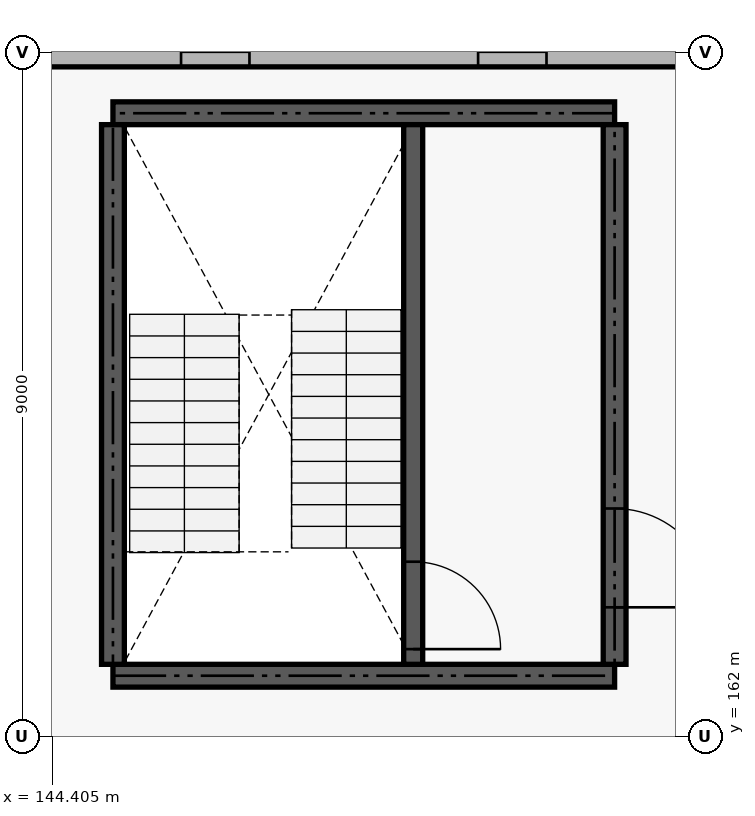
"""IFC4 building model, lengths in metres.
Left out: names, types, materials, properties, quantities, classifications, styles, units other than length and angle.
Written with IfcOpenShell. Run it as: python <this file> out.ifc"""

import sys

from ifc_helpers import new_model, si_unit, direction, frame, frame_2d, origin, place, context, subcontext, project, spatial, rectangle, extrude, element, fill, save


model = new_model("IFC4")
c1 = context("Model", 3, precision=1e-05, world=origin(), true_north=direction((0.0, 1.0)))
c2 = subcontext(c1, "Body", "Model", "MODEL_VIEW")
j1 = project(units=[si_unit("LENGTHUNIT", "METRE"), si_unit("PLANEANGLEUNIT", "RADIAN")], contexts=[c1])
p1 = place(None, origin())
s1 = spatial("IfcSite", under=j1, at=p1, CompositionType="ELEMENT")
p2 = place(p1, origin())
s2 = spatial("IfcBuilding", under=s1, at=p2, CompositionType="ELEMENT")
p3 = place(p2, frame((0.0, 0.0, 5.4)))
s3 = spatial("IfcBuildingStorey", under=s2, at=p3, CompositionType="ELEMENT", Elevation=5.4)
p4 = place(p3, frame((144.06, 171.0, 0.0), z_axis=(0.0, 0.0, 1.0), x_axis=(1.0, 0.0, 0.0)))
e1 = element("IfcWall", 1, at=p4, inside=s3, PredefinedType="SOLIDWALL", context=c2, shape_type="SweptSolid", body=[
    extrude(rectangle(XDim=8.88, YDim=0.38, at=frame_2d((4.44, 0.0))), origin(), (0.0, 0.0, 1.0), 3.4),
])
p5 = place(p4, frame((2.036, 0.0, 0.9)))
e2 = element("IfcOpeningElement", 2, at=p5, cuts=e1, PredefinedType="OPENING", context=c2, shape_type="SweptSolid", body=[
    extrude(rectangle(XDim=0.9, YDim=1.2, at=frame_2d((0.45, 0.6))), frame((0.0, 0.2, 0.0), z_axis=(0.0, -1.0, 0.0), x_axis=(1.0, 0.0, 0.0)), (0.0, 0.0, 1.0), 0.4),
])
p6 = place(p4, frame((5.944, 0.0, 0.9)))
e3 = element("IfcOpeningElement", 3, at=p6, cuts=e1, PredefinedType="OPENING", context=c2, shape_type="SweptSolid", body=[
    extrude(rectangle(XDim=0.9, YDim=1.2, at=frame_2d((0.45, 0.6))), frame((0.0, 0.2, 0.0), z_axis=(0.0, -1.0, 0.0), x_axis=(1.0, 0.0, 0.0)), (0.0, 0.0, 1.0), 0.4),
])
for number, where, z_axis, x_axis in (
    (4, (145.2, 162.8, 0.0), (0.0, 0.0, 1.0), (1.0, 0.0, 0.0)),
    (5, (145.2, 170.2, 0.0), (0.0, 0.0, 1.0), (1.0, 0.0, 0.0)),
):
    element("IfcWall", number, at=place(p3, frame(where, z_axis=z_axis, x_axis=x_axis)), inside=s3, PredefinedType="SHEAR", context=c2, shape_type="SweptSolid", body=[
        extrude(rectangle(XDim=6.6, YDim=0.3, at=frame_2d((3.3, 0.0))), origin(), (0.0, 0.0, 1.0), 4.2),
    ])
p7 = place(p3, frame((145.2, 162.95, 0.0), z_axis=(0.0, 0.0, 1.0), x_axis=(0.0, 1.0, 0.0)))
e6 = element("IfcWall", 6, at=p7, inside=s3, PredefinedType="SHEAR", context=c2, shape_type="SweptSolid", body=[
    extrude(rectangle(XDim=7.1, YDim=0.3, at=frame_2d((3.55, 0.0))), origin(), (0.0, 0.0, 1.0), 4.2),
])
p8 = place(p3, frame((151.8, 162.95, 0.0), z_axis=(0.0, 0.0, 1.0), x_axis=(0.0, 1.0, 0.0)))
e7 = element("IfcWall", 7, at=p8, inside=s3, PredefinedType="SHEAR", context=c2, shape_type="SweptSolid", body=[
    extrude(rectangle(XDim=7.1, YDim=0.3, at=frame_2d((3.55, 0.0))), origin(), (0.0, 0.0, 1.0), 4.2),
])
p9 = place(p8, frame((0.75, 0.0, 0.0)))
e8 = element("IfcOpeningElement", 8, at=p9, cuts=e7, PredefinedType="OPENING", context=c2, shape_type="SweptSolid", body=[
    extrude(rectangle(XDim=1.3, YDim=2.15, at=frame_2d((0.65, 1.075))), frame((0.0, 0.16, 0.0), z_axis=(0.0, -1.0, 0.0), x_axis=(1.0, 0.0, 0.0)), (0.0, 0.0, 1.0), 0.32),
])
p10 = place(p3, frame((149.15, 162.95, 0.0), z_axis=(0.0, 0.0, 1.0), x_axis=(0.0, 1.0, 0.0)))
e9 = element("IfcWall", 9, at=p10, inside=s3, PredefinedType="SHEAR", context=c2, shape_type="SweptSolid", body=[
    extrude(rectangle(XDim=7.1, YDim=0.25, at=frame_2d((3.55, 0.0))), origin(), (0.0, 0.0, 1.0), 4.2),
])
p11 = place(p10, frame((0.2, 0.0, 0.0)))
e10 = element("IfcOpeningElement", 10, at=p11, cuts=e9, PredefinedType="OPENING", context=c2, shape_type="SweptSolid", body=[
    extrude(rectangle(XDim=1.15, YDim=2.15, at=frame_2d((0.575, 1.075))), frame((0.0, 0.135, 0.0), z_axis=(0.0, -1.0, 0.0), x_axis=(1.0, 0.0, 0.0)), (0.0, 0.0, 1.0), 0.27),
])
p12 = place(p5, origin())
e11 = element("IfcWindow", 11, at=p12, inside=s3, PartitioningType="SINGLE_PANEL", PredefinedType="WINDOW", context=c2, shape_type="SweptSolid", body=[
    extrude(rectangle(XDim=0.9, YDim=1.2, at=frame_2d((0.45, 0.6))), frame((0.0, 0.03, 0.0), z_axis=(0.0, -1.0, 0.0), x_axis=(1.0, 0.0, 0.0)), (0.0, 0.0, 1.0), 0.06),
])
fill(e2, e11)
p13 = place(p6, origin())
e12 = element("IfcWindow", 12, at=p13, inside=s3, PartitioningType="SINGLE_PANEL", PredefinedType="WINDOW", context=c2, shape_type="SweptSolid", body=[
    extrude(rectangle(XDim=0.9, YDim=1.2, at=frame_2d((0.45, 0.6))), frame((0.0, 0.03, 0.0), z_axis=(0.0, -1.0, 0.0), x_axis=(1.0, 0.0, 0.0)), (0.0, 0.0, 1.0), 0.06),
])
fill(e3, e12)
p14 = place(p9, frame((1.3, 0.0, 0.0), z_axis=(0.0, 0.0, 1.0), x_axis=(-1.0, 0.0, 0.0)))
e13 = element("IfcDoor", 13, at=p14, inside=s3, OperationType="DOUBLE_DOOR_SINGLE_SWING", PredefinedType="DOOR", context=c2, shape_type="SweptSolid", body=[
    extrude(rectangle(XDim=1.3, YDim=2.15, at=frame_2d((0.65, 1.075))), frame((0.0, 0.025, 0.0), z_axis=(0.0, -1.0, 0.0), x_axis=(1.0, 0.0, 0.0)), (0.0, 0.0, 1.0), 0.05),
])
fill(e8, e13)
p15 = place(p11, frame((1.15, 0.0, 0.0), z_axis=(0.0, 0.0, 1.0), x_axis=(-1.0, 0.0, 0.0)))
e14 = element("IfcDoor", 14, at=p15, inside=s3, OperationType="SINGLE_SWING_LEFT", PredefinedType="DOOR", context=c2, shape_type="SweptSolid", body=[
    extrude(rectangle(XDim=1.15, YDim=2.15, at=frame_2d((0.575, 1.075))), frame((0.0, 0.025, 0.0), z_axis=(0.0, -1.0, 0.0), x_axis=(1.0, 0.0, 0.0)), (0.0, 0.0, 1.0), 0.05),
])
fill(e10, e14)
save(model, sys.argv[1])
